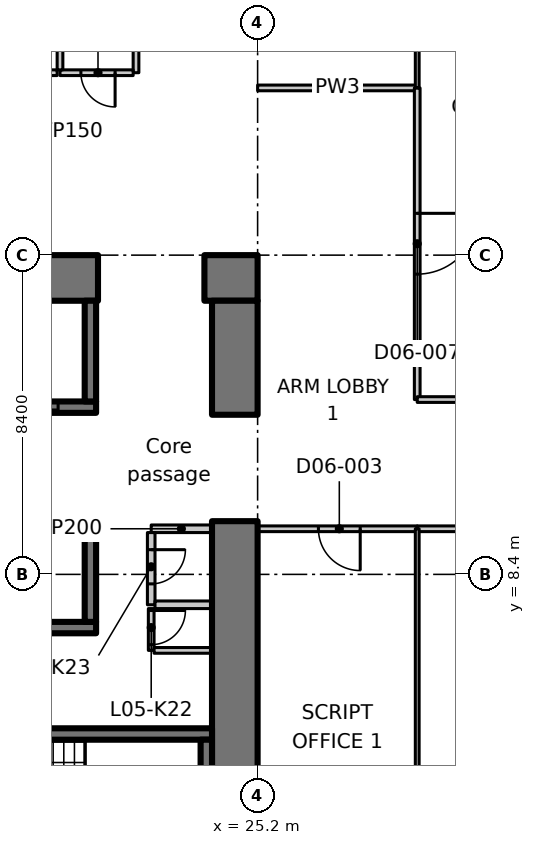
"""IFC4 building model, lengths in metres.
Left out: names, types, materials, properties, quantities, classifications, styles, units other than length and angle.
Written with IfcOpenShell. Run it as: python <this file> out.ifc"""

import sys

from ifc_helpers import new_model, si_unit, direction, frame, frame_2d, origin, place, context, subcontext, project, spatial, polyline, rectangle, outline, extrude, element, fill, save


model = new_model("IFC4")
c1 = context("Model", 3, precision=1e-05, world=origin(), true_north=direction((0.0, 1.0)))
c2 = subcontext(c1, "Body", "Model", "MODEL_VIEW")
j1 = project(units=[si_unit("LENGTHUNIT", "METRE"), si_unit("PLANEANGLEUNIT", "RADIAN")], contexts=[c1])
p1 = place(None, origin())
s1 = spatial("IfcSite", under=j1, at=p1, CompositionType="ELEMENT")
p2 = place(p1, origin())
s2 = spatial("IfcBuilding", under=s1, at=p2, CompositionType="ELEMENT")
p3 = place(p2, frame((0.0, 0.0, 32.0)))
s3 = spatial("IfcBuildingStorey", under=s2, at=p3, CompositionType="ELEMENT", Elevation=32.0)
p4 = place(p3, frame((-1.1, 16.2, 0.0), z_axis=(0.0, 0.0, 1.0), x_axis=(1.0, 0.0, 0.0)))
e1 = element("IfcWall", 1, at=p4, inside=s3, PredefinedType="SHEAR", context=c2, shape_type="SweptSolid", body=[
    extrude(rectangle(XDim=22.1, YDim=1.2, at=frame_2d((11.05, 0.0))), origin(), (0.0, 0.0, 1.0), 4.25),
])
p5 = place(p4, frame((3.15, 0.0, 0.0)))
e2 = element("IfcOpeningElement", 2, at=p5, cuts=e1, PredefinedType="OPENING", context=c2, shape_type="SweptSolid", body=[
    extrude(rectangle(XDim=1.1, YDim=2.3, at=frame_2d((0.55, 1.15))), frame((0.0, 0.61, 0.0), z_axis=(0.0, -1.0, 0.0), x_axis=(1.0, 0.0, 0.0)), (0.0, 0.0, 1.0), 1.22),
])
p6 = place(p3, frame((23.8, 16.2, 0.0), z_axis=(0.0, 0.0, 1.0), x_axis=(1.0, 0.0, 0.0)))
e3 = element("IfcWall", 3, at=p6, inside=s3, PredefinedType="SHEAR", context=c2, shape_type="SweptSolid", body=[
    extrude(rectangle(XDim=1.4, YDim=1.2, at=frame_2d((0.7, 0.0))), origin(), (0.0, 0.0, 1.0), 4.25),
])
p7 = place(p3, frame((24.6, 1.2, 0.0), z_axis=(0.0, 0.0, 1.0), x_axis=(0.0, 1.0, 0.0)))
e4 = element("IfcWall", 4, at=p7, inside=s3, PredefinedType="SHEAR", context=c2, shape_type="SweptSolid", body=[
    extrude(rectangle(XDim=8.6, YDim=1.2, at=frame_2d((4.3, 0.0))), origin(), (0.0, 0.0, 1.0), 4.25),
])
p8 = place(p3, frame((24.6, 12.6, 0.0), z_axis=(0.0, 0.0, 1.0), x_axis=(0.0, 1.0, 0.0)))
e5 = element("IfcWall", 5, at=p8, inside=s3, PredefinedType="SHEAR", context=c2, shape_type="SweptSolid", body=[
    extrude(rectangle(XDim=3.0, YDim=1.2, at=frame_2d((1.5, 0.0))), origin(), (0.0, 0.0, 1.0), 4.25),
])
p9 = place(p3, frame((1.2, 7.0, 0.0), z_axis=(0.0, 0.0, 1.0), x_axis=(1.0, 0.0, 0.0)))
e6 = element("IfcWall", 6, at=p9, inside=s3, PredefinedType="SHEAR", context=c2, shape_type="SweptSolid", body=[
    extrude(rectangle(XDim=19.75, YDim=0.3, at=frame_2d((9.875, 0.0))), origin(), (0.0, 0.0, 1.0), 4.25),
])
p10 = place(p3, frame((1.2, 9.6, 0.0), z_axis=(0.0, 0.0, 1.0), x_axis=(1.0, 0.0, 0.0)))
e7 = element("IfcWall", 7, at=p10, inside=s3, PredefinedType="SHEAR", context=c2, shape_type="SweptSolid", body=[
    extrude(rectangle(XDim=19.75, YDim=0.3, at=frame_2d((9.875, 0.0))), origin(), (0.0, 0.0, 1.0), 4.25),
])
p11 = place(p10, frame((0.85, 0.0, 0.0)))
e8 = element("IfcOpeningElement", 8, at=p11, cuts=e7, PredefinedType="OPENING", context=c2, shape_type="SweptSolid", body=[
    extrude(rectangle(XDim=1.1, YDim=2.3, at=frame_2d((0.55, 1.15))), frame((0.0, 0.16, 0.0), z_axis=(0.0, -1.0, 0.0), x_axis=(1.0, 0.0, 0.0)), (0.0, 0.0, 1.0), 0.32),
])
p12 = place(p10, frame((3.65, 0.0, 0.0)))
e9 = element("IfcOpeningElement", 9, at=p12, cuts=e7, PredefinedType="OPENING", context=c2, shape_type="SweptSolid", body=[
    extrude(rectangle(XDim=1.1, YDim=2.3, at=frame_2d((0.55, 1.15))), frame((0.0, 0.16, 0.0), z_axis=(0.0, -1.0, 0.0), x_axis=(1.0, 0.0, 0.0)), (0.0, 0.0, 1.0), 0.32),
])
p13 = place(p10, frame((6.45, 0.0, 0.0)))
e10 = element("IfcOpeningElement", 10, at=p13, cuts=e7, PredefinedType="OPENING", context=c2, shape_type="SweptSolid", body=[
    extrude(rectangle(XDim=1.1, YDim=2.3, at=frame_2d((0.55, 1.15))), frame((0.0, 0.16, 0.0), z_axis=(0.0, -1.0, 0.0), x_axis=(1.0, 0.0, 0.0)), (0.0, 0.0, 1.0), 0.32),
])
p14 = place(p10, frame((9.25, 0.0, 0.0)))
e11 = element("IfcOpeningElement", 11, at=p14, cuts=e7, PredefinedType="OPENING", context=c2, shape_type="SweptSolid", body=[
    extrude(rectangle(XDim=1.1, YDim=2.3, at=frame_2d((0.55, 1.15))), frame((0.0, 0.16, 0.0), z_axis=(0.0, -1.0, 0.0), x_axis=(1.0, 0.0, 0.0)), (0.0, 0.0, 1.0), 0.32),
])
p15 = place(p10, frame((12.05, 0.0, 0.0)))
e12 = element("IfcOpeningElement", 12, at=p15, cuts=e7, PredefinedType="OPENING", context=c2, shape_type="SweptSolid", body=[
    extrude(rectangle(XDim=1.1, YDim=2.3, at=frame_2d((0.55, 1.15))), frame((0.0, 0.16, 0.0), z_axis=(0.0, -1.0, 0.0), x_axis=(1.0, 0.0, 0.0)), (0.0, 0.0, 1.0), 0.32),
])
p16 = place(p10, frame((14.85, 0.0, 0.0)))
e13 = element("IfcOpeningElement", 13, at=p16, cuts=e7, PredefinedType="OPENING", context=c2, shape_type="SweptSolid", body=[
    extrude(rectangle(XDim=1.1, YDim=2.3, at=frame_2d((0.55, 1.15))), frame((0.0, 0.16, 0.0), z_axis=(0.0, -1.0, 0.0), x_axis=(1.0, 0.0, 0.0)), (0.0, 0.0, 1.0), 0.32),
])
p17 = place(p3, frame((20.8, 7.15, 0.0), z_axis=(0.0, 0.0, 1.0), x_axis=(0.0, 1.0, 0.0)))
e14 = element("IfcWall", 14, at=p17, inside=s3, PredefinedType="SHEAR", context=c2, shape_type="SweptSolid", body=[
    extrude(rectangle(XDim=2.3, YDim=0.3, at=frame_2d((1.15, 0.0))), origin(), (0.0, 0.0, 1.0), 4.25),
])
p18 = place(p3, frame((15.05, 12.8, 0.0), z_axis=(0.0, 0.0, 1.0), x_axis=(1.0, 0.0, 0.0)))
e15 = element("IfcWall", 15, at=p18, inside=s3, PredefinedType="SHEAR", context=c2, shape_type="SweptSolid", body=[
    extrude(rectangle(XDim=5.9, YDim=0.3, at=frame_2d((2.95, 0.0))), origin(), (0.0, 0.0, 1.0), 4.25),
])
p19 = place(p18, frame((3.8, 0.0, 0.0)))
e16 = element("IfcOpeningElement", 16, at=p19, cuts=e15, PredefinedType="OPENING", context=c2, shape_type="SweptSolid", body=[
    extrude(rectangle(XDim=1.1, YDim=2.3, at=frame_2d((0.55, 1.15))), frame((0.0, 0.16, 0.0), z_axis=(0.0, -1.0, 0.0), x_axis=(1.0, 0.0, 0.0)), (0.0, 0.0, 1.0), 0.32),
])
p20 = place(p3, frame((20.8, 12.95, 0.0), z_axis=(0.0, 0.0, 1.0), x_axis=(0.0, 1.0, 0.0)))
e17 = element("IfcWall", 17, at=p20, inside=s3, PredefinedType="SHEAR", context=c2, shape_type="SweptSolid", body=[
    extrude(rectangle(XDim=2.65, YDim=0.3, at=frame_2d((1.325, 0.0))), origin(), (0.0, 0.0, 1.0), 4.25),
])
p21 = place(p3, frame((15.8, 4.2, 0.0), z_axis=(0.0, 0.0, 1.0), x_axis=(1.0, 0.0, 0.0)))
e18 = element("IfcWall", 18, at=p21, inside=s3, PredefinedType="SHEAR", context=c2, shape_type="SweptSolid", body=[
    extrude(rectangle(XDim=8.2, YDim=0.3, at=frame_2d((4.1, 0.0))), origin(), (0.0, 0.0, 1.0), 4.25),
])
p22 = place(p21, frame((0.4, 0.0, 0.0)))
e19 = element("IfcOpeningElement", 19, at=p22, cuts=e18, PredefinedType="OPENING", context=c2, shape_type="SweptSolid", body=[
    extrude(rectangle(XDim=1.0, YDim=2.1, at=frame_2d((0.5, 1.05))), frame((0.0, 0.16, 0.0), z_axis=(0.0, -1.0, 0.0), x_axis=(1.0, 0.0, 0.0)), (0.0, 0.0, 1.0), 0.32),
])
p23 = place(p3, frame((23.85, 1.5, 0.0), z_axis=(0.0, 0.0, 1.0), x_axis=(0.0, 1.0, 0.0)))
e20 = element("IfcWall", 20, at=p23, inside=s3, PredefinedType="SHEAR", context=c2, shape_type="SweptSolid", body=[
    extrude(rectangle(XDim=2.55, YDim=0.3, at=frame_2d((1.275, 0.0))), origin(), (0.0, 0.0, 1.0), 4.25),
])
p24 = place(p3, frame((23.988, 9.6, 0.0), z_axis=(0.0, 0.0, 1.0), x_axis=(-1.0, 0.0, 0.0)))
e21 = element("IfcWall", 21, at=p24, inside=s3, PredefinedType="PARTITIONING", context=c2, shape_type="SweptSolid", body=[
    extrude(rectangle(XDim=1.588, YDim=0.2, at=frame_2d((0.794, 0.0))), origin(), (0.0, 0.0, 1.0), 4.25),
])
p25 = place(p3, frame((22.4, 9.5, 0.0), z_axis=(0.0, 0.0, 1.0), x_axis=(0.0, -1.0, 0.0)))
e22 = element("IfcWall", 22, at=p25, inside=s3, PredefinedType="PARTITIONING", context=c2, shape_type="SweptSolid", body=[
    extrude(rectangle(XDim=1.9, YDim=0.2, at=frame_2d((0.95, 0.0))), origin(), (0.0, 0.0, 1.0), 4.25),
])
p26 = place(p25, frame((0.45, 0.0, 0.0)))
e23 = element("IfcOpeningElement", 23, at=p26, cuts=e22, PredefinedType="OPENING", context=c2, shape_type="SweptSolid", body=[
    extrude(rectangle(XDim=0.9, YDim=2.1, at=frame_2d((0.45, 1.05))), frame((0.0, 0.11, 0.0), z_axis=(0.0, -1.0, 0.0), x_axis=(1.0, 0.0, 0.0)), (0.0, 0.0, 1.0), 0.22),
])
p27 = place(p3, frame((22.5, 7.6, 0.0), z_axis=(0.0, 0.0, 1.0), x_axis=(1.0, 0.0, 0.0)))
e24 = element("IfcWall", 24, at=p27, inside=s3, PredefinedType="PARTITIONING", context=c2, shape_type="SweptSolid", body=[
    extrude(rectangle(XDim=1.488, YDim=0.2, at=frame_2d((0.744, 0.0))), origin(), (0.0, 0.0, 1.0), 4.25),
])
p28 = place(p3, frame((22.0, 23.925, 0.0), z_axis=(0.0, 0.0, 1.0), x_axis=(0.0, -1.0, 0.0)))
e25 = element("IfcWall", 25, at=p28, inside=s3, PredefinedType="PARTITIONING", context=c2, shape_type="SweptSolid", body=[
    extrude(rectangle(XDim=2.325, YDim=0.15, at=frame_2d((1.163, 0.0))), origin(), (0.0, 0.0, 1.0), 4.25),
])
p29 = place(p3, frame((21.925, 21.6, 0.0), z_axis=(0.0, 0.0, 1.0), x_axis=(-1.0, 0.0, 0.0)))
e26 = element("IfcWall", 26, at=p29, inside=s3, PredefinedType="PARTITIONING", context=c2, shape_type="SweptSolid", body=[
    extrude(rectangle(XDim=1.925, YDim=0.15, at=frame_2d((0.962, 0.0))), origin(), (0.0, 0.0, 1.0), 4.25),
])
p30 = place(p29, frame((0.475, 0.0, 0.0)))
e27 = element("IfcOpeningElement", 27, at=p30, cuts=e26, PredefinedType="OPENING", context=c2, shape_type="SweptSolid", body=[
    extrude(rectangle(XDim=0.9, YDim=2.1, at=frame_2d((0.45, 1.05))), frame((0.0, 0.085, 0.0), z_axis=(0.0, -1.0, 0.0), x_axis=(1.0, 0.0, 0.0)), (0.0, 0.0, 1.0), 0.17),
])
p31 = place(p3, frame((20.0, 21.675, 0.0), z_axis=(0.0, 0.0, 1.0), x_axis=(0.0, 1.0, 0.0)))
e28 = element("IfcWall", 28, at=p31, inside=s3, PredefinedType="PARTITIONING", context=c2, shape_type="SweptSolid", body=[
    extrude(rectangle(XDim=2.25, YDim=0.15, at=frame_2d((1.125, 0.0))), origin(), (0.0, 0.0, 1.0), 4.25),
])
p32 = place(p3, frame((19.925, 21.6, 0.0), z_axis=(0.0, 0.0, 1.0), x_axis=(-1.0, 0.0, 0.0)))
e29 = element("IfcWall", 29, at=p32, inside=s3, PredefinedType="PARTITIONING", context=c2, shape_type="SweptSolid", body=[
    extrude(rectangle(XDim=2.325, YDim=0.15, at=frame_2d((1.163, 0.0))), origin(), (0.0, 0.0, 1.0), 4.25),
])
p33 = place(p32, frame((0.675, 0.0, 0.0)))
e30 = element("IfcOpeningElement", 30, at=p33, cuts=e29, PredefinedType="OPENING", context=c2, shape_type="SweptSolid", body=[
    extrude(rectangle(XDim=0.9, YDim=2.1, at=frame_2d((0.45, 1.05))), frame((0.0, 0.085, 0.0), z_axis=(0.0, -1.0, 0.0), x_axis=(1.0, 0.0, 0.0)), (0.0, 0.0, 1.0), 0.17),
])
p34 = place(p3, frame((22.4, 7.5, 0.0), z_axis=(0.0, 0.0, 1.0), x_axis=(0.0, -1.0, 0.0)))
e31 = element("IfcWall", 31, at=p34, inside=s3, PredefinedType="PARTITIONING", context=c2, shape_type="SweptSolid", body=[
    extrude(rectangle(XDim=1.1, YDim=0.15, at=frame_2d((0.55, 0.0))), origin(), (0.0, 0.0, 1.0), 4.25),
])
p35 = place(p34, frame((0.05, 0.0, 0.0)))
e32 = element("IfcOpeningElement", 32, at=p35, cuts=e31, PredefinedType="OPENING", context=c2, shape_type="SweptSolid", body=[
    extrude(rectangle(XDim=0.9, YDim=2.1, at=frame_2d((0.45, 1.05))), frame((0.0, 0.085, 0.0), z_axis=(0.0, -1.0, 0.0), x_axis=(1.0, 0.0, 0.0)), (0.0, 0.0, 1.0), 0.17),
])
p36 = place(p3, frame((22.475, 6.4, 0.0), z_axis=(0.0, 0.0, 1.0), x_axis=(1.0, 0.0, 0.0)))
e33 = element("IfcWall", 33, at=p36, inside=s3, PredefinedType="PARTITIONING", context=c2, shape_type="SweptSolid", body=[
    extrude(rectangle(XDim=1.513, YDim=0.15, at=frame_2d((0.756, 0.0))), origin(), (0.0, 0.0, 1.0), 4.25),
])
p37 = place(p3, frame((25.2, 21.2, 0.0), z_axis=(0.0, 0.0, 1.0), x_axis=(1.0, 0.0, 0.0)))
e34 = element("IfcWall", 34, at=p37, inside=s3, PredefinedType="PARTITIONING", context=c2, shape_type="SweptSolid", body=[
    extrude(rectangle(XDim=4.2, YDim=0.15, at=frame_2d((2.1, 0.0))), origin(), (0.0, 0.0, 1.0), 4.23),
])
p38 = place(p3, frame((29.4, 9.6, 0.0), z_axis=(0.0, 0.0, 1.0), x_axis=(-1.0, 0.0, 0.0)))
e35 = element("IfcWall", 35, at=p38, inside=s3, PredefinedType="PARTITIONING", context=c2, shape_type="SweptSolid", body=[
    extrude(rectangle(XDim=4.2, YDim=0.15, at=frame_2d((2.1, 0.0))), origin(), (0.0, 0.0, 1.0), 4.23),
])
p39 = place(p38, frame((1.5, 0.0, 0.0)))
e36 = element("IfcOpeningElement", 36, at=p39, cuts=e35, PredefinedType="OPENING", context=c2, shape_type="SweptSolid", body=[
    extrude(rectangle(XDim=1.1, YDim=2.1, at=frame_2d((0.55, 1.05))), frame((0.0, 0.085, 0.0), z_axis=(0.0, -1.0, 0.0), x_axis=(1.0, 0.0, 0.0)), (0.0, 0.0, 1.0), 0.17),
])
p40 = place(p3, frame((29.4, 21.2, 0.0), z_axis=(0.0, 0.0, 1.0), x_axis=(0.0, -1.0, 0.0)))
e37 = element("IfcWall", 37, at=p40, inside=s3, PredefinedType="PARTITIONING", context=c2, shape_type="SweptSolid", body=[
    extrude(rectangle(XDim=8.2, YDim=0.15, at=frame_2d((4.1, 0.0))), origin(), (0.0, 0.0, 1.0), 4.23),
])
p41 = place(p40, frame((3.3, 0.0, 0.0)))
e38 = element("IfcOpeningElement", 38, at=p41, cuts=e37, PredefinedType="OPENING", context=c2, shape_type="SweptSolid", body=[
    extrude(rectangle(XDim=1.6, YDim=2.1, at=frame_2d((0.8, 1.05))), frame((0.0, 0.085, 0.0), z_axis=(0.0, -1.0, 0.0), x_axis=(1.0, 0.0, 0.0)), (0.0, 0.0, 1.0), 0.17),
])
p42 = place(p3, frame((29.4, 27.275, 0.0), z_axis=(0.0, 0.0, 1.0), x_axis=(0.0, -1.0, 0.0)))
e39 = element("IfcWall", 39, at=p42, inside=s3, PredefinedType="PARTITIONING", context=c2, shape_type="SweptSolid", body=[
    extrude(outline(polyline([(0.0, 0.0), (6.075, 0.0), (6.075, 4.23), (2.525, 4.23), (2.523, 3.88), (1.627, 3.88), (1.625, 4.23), (0.0, 4.23), (0.0, 0.0)])), frame((0.0, 0.05, 0.0), z_axis=(0.0, -1.0, 0.0), x_axis=(1.0, 0.0, 0.0)), (0.0, 0.0, 1.0), 0.1),
])
p43 = place(p3, frame((46.2, 9.6, 0.0), z_axis=(0.0, 0.0, 1.0), x_axis=(-1.0, 0.0, 0.0)))
e40 = element("IfcWall", 40, at=p43, inside=s3, PredefinedType="PARTITIONING", context=c2, shape_type="SweptSolid", body=[
    extrude(rectangle(XDim=16.8, YDim=0.15, at=frame_2d((8.4, 0.0))), origin(), (0.0, 0.0, 1.0), 4.23),
])
p44 = place(p43, frame((7.5, 0.0, 0.0)))
e41 = element("IfcOpeningElement", 41, at=p44, cuts=e40, PredefinedType="OPENING", context=c2, shape_type="SweptSolid", body=[
    extrude(rectangle(XDim=2.0, YDim=2.4, at=frame_2d((1.0, 1.2))), frame((0.0, 0.085, 0.0), z_axis=(0.0, -1.0, 0.0), x_axis=(1.0, 0.0, 0.0)), (0.0, 0.0, 1.0), 0.17),
])
p45 = place(p3, frame((29.4, 13.0, 0.0), z_axis=(0.0, 0.0, 1.0), x_axis=(1.0, 0.0, 0.0)))
e42 = element("IfcWall", 42, at=p45, inside=s3, PredefinedType="PARTITIONING", context=c2, shape_type="SweptSolid", body=[
    extrude(rectangle(XDim=4.2, YDim=0.15, at=frame_2d((2.1, 0.0))), origin(), (0.0, 0.0, 1.0), 4.23),
])
p46 = place(p3, frame((29.4, 9.6, 0.0), z_axis=(0.0, 0.0, 1.0), x_axis=(0.0, -1.0, 0.0)))
e43 = element("IfcWall", 43, at=p46, inside=s3, PredefinedType="PARTITIONING", context=c2, shape_type="SweptSolid", body=[
    extrude(outline(polyline([(0.0, 0.0), (11.67, 0.0), (11.67, 4.23), (10.7, 4.23), (10.05, 4.23), (10.048, 3.88), (9.152, 3.88), (9.15, 4.23), (0.0, 4.23), (0.0, 0.0)])), frame((0.0, 0.05, 0.0), z_axis=(0.0, -1.0, 0.0), x_axis=(1.0, 0.0, 0.0)), (0.0, 0.0, 1.0), 0.1),
])
p47 = place(p19, origin())
e44 = element("IfcDoor", 44, at=p47, inside=s3, OperationType="SLIDING_TO_LEFT", PredefinedType="DOOR", context=c2, shape_type="SweptSolid", body=[
    extrude(rectangle(XDim=1.1, YDim=2.3, at=frame_2d((0.55, 1.15))), frame((0.0, 0.025, 0.0), z_axis=(0.0, -1.0, 0.0), x_axis=(1.0, 0.0, 0.0)), (0.0, 0.0, 1.0), 0.05),
])
fill(e16, e44)
p48 = place(p35, origin())
e45 = element("IfcDoor", 45, at=p48, inside=s3, OperationType="SINGLE_SWING_LEFT", PredefinedType="DOOR", context=c2, shape_type="SweptSolid", body=[
    extrude(rectangle(XDim=0.9, YDim=2.1, at=frame_2d((0.45, 1.05))), frame((0.0, 0.025, 0.0), z_axis=(0.0, -1.0, 0.0), x_axis=(1.0, 0.0, 0.0)), (0.0, 0.0, 1.0), 0.05),
])
fill(e32, e45)
p49 = place(p26, origin())
e46 = element("IfcDoor", 46, at=p49, inside=s3, OperationType="SINGLE_SWING_RIGHT", PredefinedType="DOOR", context=c2, shape_type="SweptSolid", body=[
    extrude(rectangle(XDim=0.9, YDim=2.1, at=frame_2d((0.45, 1.05))), frame((0.0, 0.025, 0.0), z_axis=(0.0, -1.0, 0.0), x_axis=(1.0, 0.0, 0.0)), (0.0, 0.0, 1.0), 0.05),
])
fill(e23, e46)
p50 = place(p30, origin())
e47 = element("IfcDoor", 47, at=p50, inside=s3, OperationType="SINGLE_SWING_RIGHT", PredefinedType="DOOR", context=c2, shape_type="SweptSolid", body=[
    extrude(rectangle(XDim=0.9, YDim=2.1, at=frame_2d((0.45, 1.05))), frame((0.0, 0.025, 0.0), z_axis=(0.0, -1.0, 0.0), x_axis=(1.0, 0.0, 0.0)), (0.0, 0.0, 1.0), 0.05),
])
fill(e27, e47)
p51 = place(p39, origin())
e48 = element("IfcDoor", 48, at=p51, inside=s3, OperationType="SINGLE_SWING_LEFT", PredefinedType="DOOR", context=c2, shape_type="SweptSolid", body=[
    extrude(rectangle(XDim=1.1, YDim=2.1, at=frame_2d((0.55, 1.05))), frame((0.0, 0.025, 0.0), z_axis=(0.0, -1.0, 0.0), x_axis=(1.0, 0.0, 0.0)), (0.0, 0.0, 1.0), 0.05),
])
fill(e36, e48)
p52 = place(p41, origin())
e49 = element("IfcDoor", 49, at=p52, inside=s3, OperationType="DOUBLE_DOOR_SINGLE_SWING", PredefinedType="DOOR", context=c2, shape_type="SweptSolid", body=[
    extrude(rectangle(XDim=1.6, YDim=2.1, at=frame_2d((0.8, 1.05))), frame((0.0, 0.025, 0.0), z_axis=(0.0, -1.0, 0.0), x_axis=(1.0, 0.0, 0.0)), (0.0, 0.0, 1.0), 0.05),
])
fill(e38, e49)
save(model, sys.argv[1])
